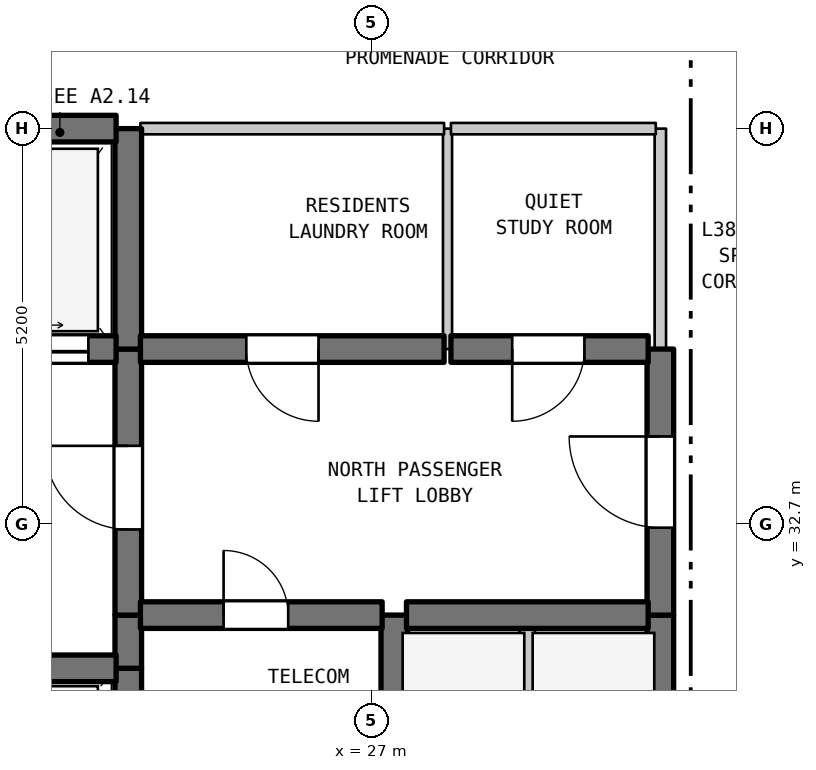
"""IFC4 building model, lengths in metres.
Left out: names, types, materials, properties, quantities, classifications, styles, units other than length and angle.
Written with IfcOpenShell. Run it as: python <this file> out.ifc"""

import sys

from ifc_helpers import new_model, si_unit, direction, frame, frame_2d, origin, place, context, subcontext, project, spatial, rectangle, extrude, element, fill, save


model = new_model("IFC4")
c1 = context("Model", 3, precision=1e-05, world=origin(), true_north=direction((0.0, 1.0)))
c2 = subcontext(c1, "Body", "Model", "MODEL_VIEW")
j1 = project(units=[si_unit("LENGTHUNIT", "METRE"), si_unit("PLANEANGLEUNIT", "RADIAN")], contexts=[c1])
p1 = place(None, origin())
s1 = spatial("IfcSite", under=j1, at=p1, CompositionType="ELEMENT")
p2 = place(p1, origin())
s2 = spatial("IfcBuilding", under=s1, at=p2, CompositionType="ELEMENT")
p3 = place(p2, frame((0.0, 0.0, 155.7)))
s3 = spatial("IfcBuildingStorey", under=s2, at=p3, CompositionType="ELEMENT", Elevation=155.7)
p4 = place(p3, frame((23.8, 29.5, 0.0), z_axis=(0.0, 0.0, 1.0), x_axis=(0.0, 1.0, 0.0)))
e1 = element("IfcWall", 1, at=p4, inside=s3, PredefinedType="SHEAR", context=c2, shape_type="SweptSolid", body=[
    extrude(rectangle(XDim=1.3, YDim=0.35, at=frame_2d((0.65, 0.0))), origin(), (0.0, 0.0, 1.0), 3.28),
])
p5 = place(p3, frame((23.8, 30.8, 0.0), z_axis=(0.0, 0.0, 1.0), x_axis=(0.0, 1.0, 0.0)))
e2 = element("IfcWall", 2, at=p5, inside=s3, PredefinedType="SHEAR", context=c2, shape_type="SweptSolid", body=[
    extrude(rectangle(XDim=0.7, YDim=0.35, at=frame_2d((0.35, 0.0))), origin(), (0.0, 0.0, 1.0), 3.28),
])
p6 = place(p3, frame((23.8, 31.5, 0.0), z_axis=(0.0, 0.0, 1.0), x_axis=(0.0, 1.0, 0.0)))
e3 = element("IfcWall", 3, at=p6, inside=s3, PredefinedType="SHEAR", context=c2, shape_type="SweptSolid", body=[
    extrude(rectangle(XDim=3.5, YDim=0.35, at=frame_2d((1.75, 0.0))), origin(), (0.0, 0.0, 1.0), 3.28),
])
p7 = place(p6, frame((1.127, 0.0, 0.0)))
e4 = element("IfcOpeningElement", 4, at=p7, cuts=e3, PredefinedType="OPENING", context=c2, shape_type="SweptSolid", body=[
    extrude(rectangle(XDim=1.1, YDim=2.15, at=frame_2d((0.55, 1.075))), frame((0.0, 0.185, 0.0), z_axis=(0.0, -1.0, 0.0), x_axis=(1.0, 0.0, 0.0)), (0.0, 0.0, 1.0), 0.37),
])
p8 = place(p3, frame((23.8, 35.0, 0.0), z_axis=(0.0, 0.0, 1.0), x_axis=(0.0, 1.0, 0.0)))
e5 = element("IfcWall", 5, at=p8, inside=s3, PredefinedType="SHEAR", context=c2, shape_type="SweptSolid", body=[
    extrude(rectangle(XDim=2.9, YDim=0.35, at=frame_2d((1.45, 0.0))), origin(), (0.0, 0.0, 1.0), 3.28),
])
p9 = place(p3, frame((27.3, 29.5, 0.0), z_axis=(0.0, 0.0, 1.0), x_axis=(0.0, 1.0, 0.0)))
e6 = element("IfcWall", 6, at=p9, inside=s3, PredefinedType="SHEAR", context=c2, shape_type="SweptSolid", body=[
    extrude(rectangle(XDim=2.0, YDim=0.35, at=frame_2d((1.0, 0.0))), origin(), (0.0, 0.0, 1.0), 3.28),
])
p10 = place(p3, frame((28.0, 35.0, 0.0), z_axis=(0.0, 0.0, 1.0), x_axis=(0.0, 1.0, 0.0)))
e7 = element("IfcWall", 7, at=p10, inside=s3, PredefinedType="PARTITIONING", context=c2, shape_type="SweptSolid", body=[
    extrude(rectangle(XDim=2.9, YDim=0.12, at=frame_2d((1.45, 0.0))), origin(), (0.0, 0.0, 1.0), 3.28),
])
p11 = place(p3, frame((29.05, 28.9, 0.0), z_axis=(0.0, 0.0, 1.0), x_axis=(0.0, 1.0, 0.0)))
e8 = element("IfcWall", 8, at=p11, inside=s3, PredefinedType="STANDARD", context=c2, shape_type="SweptSolid", body=[
    extrude(rectangle(XDim=2.6, YDim=0.2, at=frame_2d((1.3, 0.0))), origin(), (0.0, 0.0, 1.0), 3.28),
])
p12 = place(p3, frame((30.8, 28.9, 0.0), z_axis=(0.0, 0.0, 1.0), x_axis=(0.0, 1.0, 0.0)))
e9 = element("IfcWall", 9, at=p12, inside=s3, PredefinedType="SHEAR", context=c2, shape_type="SweptSolid", body=[
    extrude(rectangle(XDim=2.6, YDim=0.35, at=frame_2d((1.3, 0.0))), origin(), (0.0, 0.0, 1.0), 3.28),
])
p13 = place(p3, frame((30.8, 31.5, 0.0), z_axis=(0.0, 0.0, 1.0), x_axis=(0.0, 1.0, 0.0)))
e10 = element("IfcWall", 10, at=p13, inside=s3, PredefinedType="SHEAR", context=c2, shape_type="SweptSolid", body=[
    extrude(rectangle(XDim=3.5, YDim=0.35, at=frame_2d((1.75, 0.0))), origin(), (0.0, 0.0, 1.0), 3.28),
])
p14 = place(p13, frame((1.15, 0.0, 0.0)))
e11 = element("IfcOpeningElement", 11, at=p14, cuts=e10, PredefinedType="OPENING", context=c2, shape_type="SweptSolid", body=[
    extrude(rectangle(XDim=1.2, YDim=2.2, at=frame_2d((0.6, 1.1))), frame((0.0, 0.185, 0.0), z_axis=(0.0, -1.0, 0.0), x_axis=(1.0, 0.0, 0.0)), (0.0, 0.0, 1.0), 0.37),
])
p15 = place(p3, frame((30.8, 35.0, 0.0), z_axis=(0.0, 0.0, 1.0), x_axis=(0.0, 1.0, 0.0)))
e12 = element("IfcWall", 12, at=p15, inside=s3, PredefinedType="STANDARD", context=c2, shape_type="SweptSolid", body=[
    extrude(rectangle(XDim=2.9, YDim=0.15, at=frame_2d((1.45, 0.0))), origin(), (0.0, 0.0, 1.0), 3.28),
])
p16 = place(p3, frame((19.16, 30.8, 0.0), z_axis=(0.0, 0.0, 1.0), x_axis=(1.0, 0.0, 0.0)))
e13 = element("IfcWall", 13, at=p16, inside=s3, PredefinedType="SHEAR", context=c2, shape_type="SweptSolid", body=[
    extrude(rectangle(XDim=4.48, YDim=0.35, at=frame_2d((2.24, 0.0))), origin(), (0.0, 0.0, 1.0), 3.28),
])
p17 = place(p3, frame((23.96, 31.5, 0.0), z_axis=(0.0, 0.0, 1.0), x_axis=(1.0, 0.0, 0.0)))
e14 = element("IfcWall", 14, at=p17, inside=s3, PredefinedType="SHEAR", context=c2, shape_type="SweptSolid", body=[
    extrude(rectangle(XDim=3.18, YDim=0.35, at=frame_2d((1.59, 0.0))), origin(), (0.0, 0.0, 1.0), 3.28),
])
p18 = place(p17, frame((1.094, 0.0, 0.0)))
e15 = element("IfcOpeningElement", 15, at=p18, cuts=e14, PredefinedType="OPENING", context=c2, shape_type="SweptSolid", body=[
    extrude(rectangle(XDim=0.85, YDim=2.1, at=frame_2d((0.425, 1.05))), frame((0.0, 0.185, 0.0), z_axis=(0.0, -1.0, 0.0), x_axis=(1.0, 0.0, 0.0)), (0.0, 0.0, 1.0), 0.37),
])
p19 = place(p3, frame((27.46, 31.5, 0.0), z_axis=(0.0, 0.0, 1.0), x_axis=(1.0, 0.0, 0.0)))
e16 = element("IfcWall", 16, at=p19, inside=s3, PredefinedType="SHEAR", context=c2, shape_type="SweptSolid", body=[
    extrude(rectangle(XDim=3.18, YDim=0.35, at=frame_2d((1.59, 0.0))), origin(), (0.0, 0.0, 1.0), 3.28),
])
p20 = place(p3, frame((19.16, 35.0, 0.0), z_axis=(0.0, 0.0, 1.0), x_axis=(1.0, 0.0, 0.0)))
e17 = element("IfcWall", 17, at=p20, inside=s3, PredefinedType="SHEAR", context=c2, shape_type="SweptSolid", body=[
    extrude(rectangle(XDim=4.48, YDim=0.35, at=frame_2d((2.24, 0.0))), origin(), (0.0, 0.0, 1.0), 3.28),
])
p21 = place(p20, frame((0.365, 0.0, 0.0)))
e18 = element("IfcOpeningElement", 18, at=p21, cuts=e17, PredefinedType="OPENING", context=c2, shape_type="SweptSolid", body=[
    extrude(rectangle(XDim=1.35, YDim=2.2, at=frame_2d((0.675, 1.1))), frame((0.0, 0.185, 0.0), z_axis=(0.0, -1.0, 0.0), x_axis=(1.0, 0.0, 0.0)), (0.0, 0.0, 1.0), 0.37),
])
p22 = place(p20, frame((2.765, 0.0, 0.0)))
e19 = element("IfcOpeningElement", 19, at=p22, cuts=e17, PredefinedType="OPENING", context=c2, shape_type="SweptSolid", body=[
    extrude(rectangle(XDim=1.35, YDim=2.2, at=frame_2d((0.675, 1.1))), frame((0.0, 0.185, 0.0), z_axis=(0.0, -1.0, 0.0), x_axis=(1.0, 0.0, 0.0)), (0.0, 0.0, 1.0), 0.37),
])
p23 = place(p3, frame((23.96, 35.0, 0.0), z_axis=(0.0, 0.0, 1.0), x_axis=(1.0, 0.0, 0.0)))
e20 = element("IfcWall", 20, at=p23, inside=s3, PredefinedType="SHEAR", context=c2, shape_type="SweptSolid", body=[
    extrude(rectangle(XDim=3.995, YDim=0.35, at=frame_2d((1.998, 0.0))), origin(), (0.0, 0.0, 1.0), 3.28),
])
p24 = place(p23, frame((1.393, 0.0, 0.0)))
e21 = element("IfcOpeningElement", 21, at=p24, cuts=e20, PredefinedType="OPENING", context=c2, shape_type="SweptSolid", body=[
    extrude(rectangle(XDim=0.95, YDim=2.15, at=frame_2d((0.475, 1.075))), frame((0.0, 0.185, 0.0), z_axis=(0.0, -1.0, 0.0), x_axis=(1.0, 0.0, 0.0)), (0.0, 0.0, 1.0), 0.37),
])
p25 = place(p3, frame((28.045, 35.0, 0.0), z_axis=(0.0, 0.0, 1.0), x_axis=(1.0, 0.0, 0.0)))
e22 = element("IfcWall", 22, at=p25, inside=s3, PredefinedType="SHEAR", context=c2, shape_type="SweptSolid", body=[
    extrude(rectangle(XDim=2.595, YDim=0.35, at=frame_2d((1.297, 0.0))), origin(), (0.0, 0.0, 1.0), 3.28),
])
p26 = place(p25, frame((0.806, 0.0, 0.0)))
e23 = element("IfcOpeningElement", 23, at=p26, cuts=e22, PredefinedType="OPENING", context=c2, shape_type="SweptSolid", body=[
    extrude(rectangle(XDim=0.95, YDim=2.15, at=frame_2d((0.475, 1.075))), frame((0.0, 0.185, 0.0), z_axis=(0.0, -1.0, 0.0), x_axis=(1.0, 0.0, 0.0)), (0.0, 0.0, 1.0), 0.37),
])
p27 = place(p3, frame((19.16, 37.9, 0.0), z_axis=(0.0, 0.0, 1.0), x_axis=(1.0, 0.0, 0.0)))
e24 = element("IfcWall", 24, at=p27, inside=s3, PredefinedType="SHEAR", context=c2, shape_type="SweptSolid", body=[
    extrude(rectangle(XDim=4.48, YDim=0.35, at=frame_2d((2.24, 0.0))), origin(), (0.0, 0.0, 1.0), 3.28),
])
p28 = place(p3, frame((23.96, 37.9, 0.0), z_axis=(0.0, 0.0, 1.0), x_axis=(1.0, 0.0, 0.0)))
e25 = element("IfcWall", 25, at=p28, inside=s3, PredefinedType="STANDARD", context=c2, shape_type="SweptSolid", body=[
    extrude(rectangle(XDim=3.995, YDim=0.15, at=frame_2d((1.998, 0.0))), origin(), (0.0, 0.0, 1.0), 2.68),
])
p29 = place(p3, frame((28.045, 37.9, 0.0), z_axis=(0.0, 0.0, 1.0), x_axis=(1.0, 0.0, 0.0)))
e26 = element("IfcWall", 26, at=p29, inside=s3, PredefinedType="STANDARD", context=c2, shape_type="SweptSolid", body=[
    extrude(rectangle(XDim=2.695, YDim=0.15, at=frame_2d((1.348, 0.0))), origin(), (0.0, 0.0, 1.0), 2.68),
])
p30 = place(p7, origin())
e27 = element("IfcDoor", 27, at=p30, inside=s3, OperationType="SINGLE_SWING_RIGHT", PredefinedType="DOOR", context=c2, shape_type="SweptSolid", body=[
    extrude(rectangle(XDim=1.1, YDim=2.15, at=frame_2d((0.55, 1.075))), frame((0.0, 0.025, 0.0), z_axis=(0.0, -1.0, 0.0), x_axis=(1.0, 0.0, 0.0)), (0.0, 0.0, 1.0), 0.05),
])
fill(e4, e27)
p31 = place(p14, origin())
e28 = element("IfcDoor", 28, at=p31, inside=s3, OperationType="SINGLE_SWING_RIGHT", PredefinedType="DOOR", context=c2, shape_type="SweptSolid", body=[
    extrude(rectangle(XDim=1.2, YDim=2.2, at=frame_2d((0.6, 1.1))), frame((0.0, 0.025, 0.0), z_axis=(0.0, -1.0, 0.0), x_axis=(1.0, 0.0, 0.0)), (0.0, 0.0, 1.0), 0.05),
])
fill(e11, e28)
p32 = place(p18, origin())
e29 = element("IfcDoor", 29, at=p32, inside=s3, OperationType="SINGLE_SWING_LEFT", PredefinedType="DOOR", context=c2, shape_type="SweptSolid", body=[
    extrude(rectangle(XDim=0.85, YDim=2.1, at=frame_2d((0.425, 1.05))), frame((0.0, 0.025, 0.0), z_axis=(0.0, -1.0, 0.0), x_axis=(1.0, 0.0, 0.0)), (0.0, 0.0, 1.0), 0.05),
])
fill(e15, e29)
p33 = place(p22, origin())
e30 = element("IfcDoor", 30, at=p33, inside=s3, OperationType="DOUBLE_DOOR_SLIDING", PredefinedType="DOOR", context=c2, shape_type="SweptSolid", body=[
    extrude(rectangle(XDim=1.35, YDim=2.2, at=frame_2d((0.675, 1.1))), frame((0.0, 0.025, 0.0), z_axis=(0.0, -1.0, 0.0), x_axis=(1.0, 0.0, 0.0)), (0.0, 0.0, 1.0), 0.05),
])
fill(e19, e30)
p34 = place(p24, frame((0.95, 0.0, 0.0), z_axis=(0.0, 0.0, 1.0), x_axis=(-1.0, 0.0, 0.0)))
e31 = element("IfcDoor", 31, at=p34, inside=s3, OperationType="SINGLE_SWING_RIGHT", PredefinedType="DOOR", context=c2, shape_type="SweptSolid", body=[
    extrude(rectangle(XDim=0.95, YDim=2.15, at=frame_2d((0.475, 1.075))), frame((0.0, 0.025, 0.0), z_axis=(0.0, -1.0, 0.0), x_axis=(1.0, 0.0, 0.0)), (0.0, 0.0, 1.0), 0.05),
])
fill(e21, e31)
p35 = place(p26, frame((0.95, 0.0, 0.0), z_axis=(0.0, 0.0, 1.0), x_axis=(-1.0, 0.0, 0.0)))
e32 = element("IfcDoor", 32, at=p35, inside=s3, OperationType="SINGLE_SWING_LEFT", PredefinedType="DOOR", context=c2, shape_type="SweptSolid", body=[
    extrude(rectangle(XDim=0.95, YDim=2.15, at=frame_2d((0.475, 1.075))), frame((0.0, 0.025, 0.0), z_axis=(0.0, -1.0, 0.0), x_axis=(1.0, 0.0, 0.0)), (0.0, 0.0, 1.0), 0.05),
])
fill(e23, e32)
save(model, sys.argv[1])
